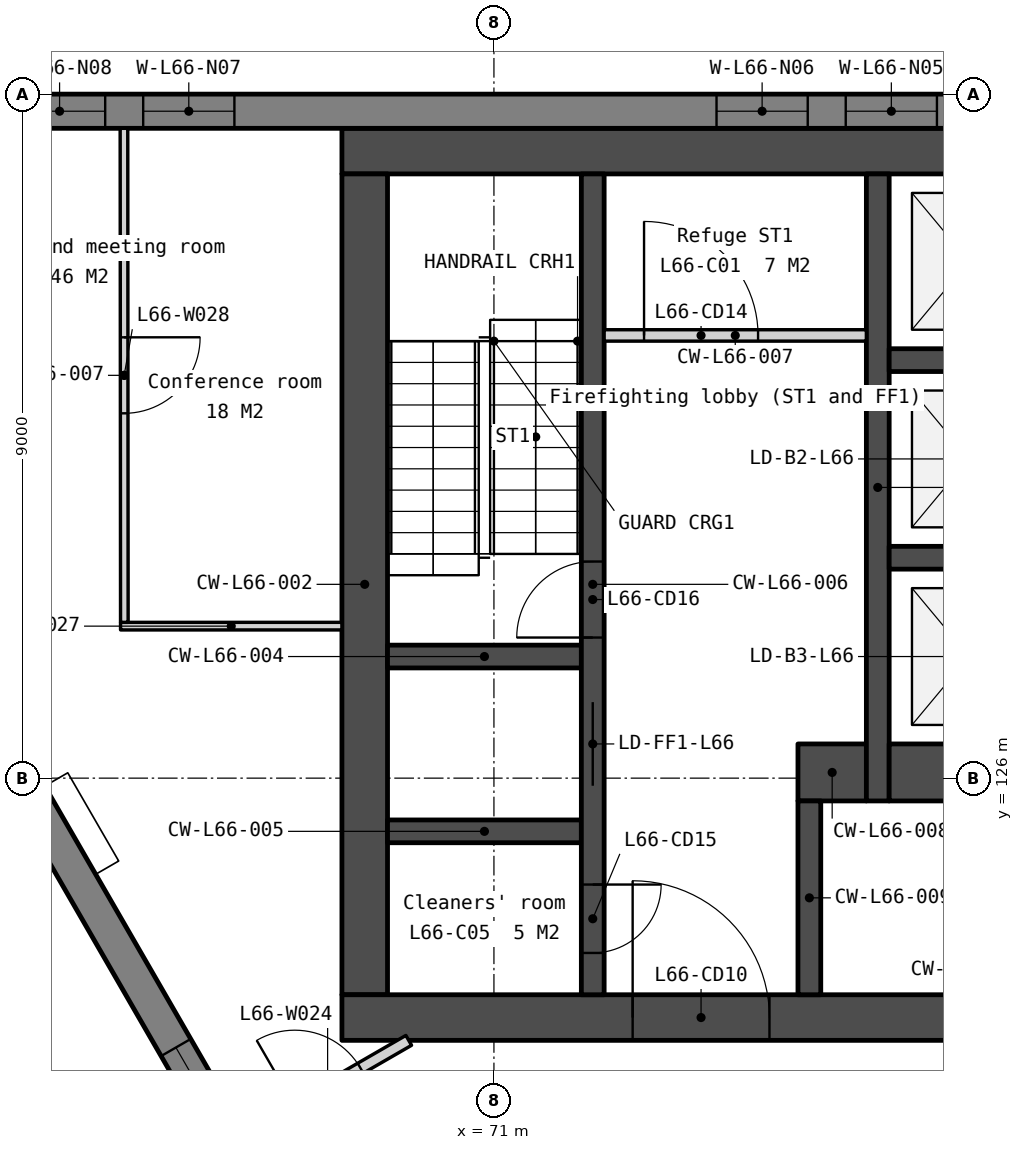
"""IFC4 building model, lengths in metres.
Left out: names, types, materials, properties, quantities, classifications, styles, units other than length and angle.
Written with IfcOpenShell. Run it as: python <this file> out.ifc"""

import sys

from ifc_helpers import new_model, si_unit, direction, frame, frame_2d, origin, place, context, subcontext, project, spatial, polyline, rectangle, outline, extrude, element, fill, save


model = new_model("IFC4")
c1 = context("Model", 3, precision=1e-05, world=origin(), true_north=direction((0.0, 1.0)))
c2 = subcontext(c1, "Body", "Model", "MODEL_VIEW")
j1 = project(units=[si_unit("LENGTHUNIT", "METRE"), si_unit("PLANEANGLEUNIT", "RADIAN")], contexts=[c1])
p1 = place(None, origin())
s1 = spatial("IfcSite", under=j1, at=p1, CompositionType="ELEMENT")
p2 = place(p1, origin())
s2 = spatial("IfcBuilding", under=s1, at=p2, CompositionType="ELEMENT")
p3 = place(p2, frame((0.0, 0.0, 269.9)))
s3 = spatial("IfcBuildingStorey", under=s2, at=p3, CompositionType="ELEMENT", Elevation=269.9)
p4 = place(p3, frame((69.0, 134.25, 0.0), z_axis=(0.0, 0.0, 1.0), x_axis=(1.0, 0.0, 0.0)))
e1 = element("IfcWall", 1, at=p4, inside=s3, PredefinedType="SOLIDWALL", context=c2, shape_type="SweptSolid", body=[
    extrude(rectangle(XDim=22.0, YDim=0.6, at=frame_2d((11.0, 0.0))), origin(), (0.0, 0.0, 1.0), 3.75),
])
p5 = place(p3, frame((69.3, 133.95, 0.0), z_axis=(0.0, 0.0, 1.0), x_axis=(0.0, -1.0, 0.0)))
e2 = element("IfcWall", 2, at=p5, inside=s3, PredefinedType="SOLIDWALL", context=c2, shape_type="SweptSolid", body=[
    extrude(rectangle(XDim=10.8, YDim=0.6, at=frame_2d((5.4, 0.0))), origin(), (0.0, 0.0, 1.0), 3.75),
])
p6 = place(p3, frame((69.0, 122.85, 0.0), z_axis=(0.0, 0.0, 1.0), x_axis=(1.0, 0.0, 0.0)))
e3 = element("IfcWall", 3, at=p6, inside=s3, PredefinedType="SOLIDWALL", context=c2, shape_type="SweptSolid", body=[
    extrude(rectangle(XDim=22.0, YDim=0.6, at=frame_2d((11.0, 0.0))), origin(), (0.0, 0.0, 1.0), 3.75),
])
p7 = place(p6, frame((16.375, 0.0, 0.0)))
e4 = element("IfcOpeningElement", 4, at=p7, cuts=e3, PredefinedType="OPENING", context=c2, shape_type="SweptSolid", body=[
    extrude(rectangle(XDim=1.8, YDim=2.1, at=frame_2d((0.9, 1.05))), frame((0.0, 0.31, 0.0), z_axis=(0.0, -1.0, 0.0), x_axis=(1.0, 0.0, 0.0)), (0.0, 0.0, 1.0), 0.62),
])
p8 = place(p6, frame((3.825, 0.0, 0.0)))
e5 = element("IfcOpeningElement", 5, at=p8, cuts=e3, PredefinedType="OPENING", context=c2, shape_type="SweptSolid", body=[
    extrude(rectangle(XDim=1.8, YDim=2.1, at=frame_2d((0.9, 1.05))), frame((0.0, 0.31, 0.0), z_axis=(0.0, -1.0, 0.0), x_axis=(1.0, 0.0, 0.0)), (0.0, 0.0, 1.0), 0.62),
])
p9 = place(p6, frame((12.85, 0.0, 0.0)))
e6 = element("IfcOpeningElement", 6, at=p9, cuts=e3, PredefinedType="OPENING", context=c2, shape_type="SweptSolid", body=[
    extrude(rectangle(XDim=1.5, YDim=2.1, at=frame_2d((0.75, 1.05))), frame((0.0, 0.31, 0.0), z_axis=(0.0, -1.0, 0.0), x_axis=(1.0, 0.0, 0.0)), (0.0, 0.0, 1.0), 0.62),
])
for number, where, z_axis, x_axis in (
    (7, (69.6, 127.6, 0.0), (0.0, 0.0, 1.0), (1.0, 0.0, 0.0)),
    (8, (69.6, 125.3, 0.0), (0.0, 0.0, 1.0), (1.0, 0.0, 0.0)),
):
    element("IfcWall", number, at=place(p3, frame(where, z_axis=z_axis, x_axis=x_axis)), inside=s3, PredefinedType="SOLIDWALL", context=c2, shape_type="SweptSolid", body=[
        extrude(rectangle(XDim=2.55, YDim=0.3, at=frame_2d((1.275, 0.0))), origin(), (0.0, 0.0, 1.0), 3.75),
    ])
p10 = place(p3, frame((72.3, 133.95, 0.0), z_axis=(0.0, 0.0, 1.0), x_axis=(0.0, -1.0, 0.0)))
e9 = element("IfcWall", 9, at=p10, inside=s3, PredefinedType="SOLIDWALL", context=c2, shape_type="SweptSolid", body=[
    extrude(rectangle(XDim=10.8, YDim=0.3, at=frame_2d((5.4, 0.0))), origin(), (0.0, 0.0, 1.0), 3.75),
])
p11 = place(p10, frame((6.95, 0.0, 0.0)))
e10 = element("IfcOpeningElement", 10, at=p11, cuts=e9, PredefinedType="OPENING", context=c2, shape_type="SweptSolid", body=[
    extrude(rectangle(XDim=1.1, YDim=2.1, at=frame_2d((0.55, 1.05))), frame((0.0, 0.16, 0.0), z_axis=(0.0, -1.0, 0.0), x_axis=(1.0, 0.0, 0.0)), (0.0, 0.0, 1.0), 0.32),
])
p12 = place(p10, frame((9.35, 0.0, 0.0)))
e11 = element("IfcOpeningElement", 11, at=p12, cuts=e9, PredefinedType="OPENING", context=c2, shape_type="SweptSolid", body=[
    extrude(rectangle(XDim=0.9, YDim=2.1, at=frame_2d((0.45, 1.05))), frame((0.0, 0.16, 0.0), z_axis=(0.0, -1.0, 0.0), x_axis=(1.0, 0.0, 0.0)), (0.0, 0.0, 1.0), 0.32),
])
p13 = place(p10, frame((5.1, 0.0, 0.0)))
e12 = element("IfcOpeningElement", 12, at=p13, cuts=e9, PredefinedType="OPENING", context=c2, shape_type="SweptSolid", body=[
    extrude(rectangle(XDim=1.0, YDim=2.1, at=frame_2d((0.5, 1.05))), frame((0.0, 0.16, 0.0), z_axis=(0.0, -1.0, 0.0), x_axis=(1.0, 0.0, 0.0)), (0.0, 0.0, 1.0), 0.32),
])
p14 = place(p3, frame((72.45, 131.825, 0.0), z_axis=(0.0, 0.0, 1.0), x_axis=(1.0, 0.0, 0.0)))
e13 = element("IfcWall", 13, at=p14, inside=s3, PredefinedType="PARTITIONING", context=c2, shape_type="SweptSolid", body=[
    extrude(rectangle(XDim=3.45, YDim=0.15, at=frame_2d((1.725, 0.0))), origin(), (0.0, 0.0, 1.0), 3.75),
])
p15 = place(p14, frame((0.525, 0.0, 0.0)))
e14 = element("IfcOpeningElement", 14, at=p15, cuts=e13, PredefinedType="OPENING", context=c2, shape_type="SweptSolid", body=[
    extrude(rectangle(XDim=1.5, YDim=2.1, at=frame_2d((0.75, 1.05))), frame((0.0, 0.085, 0.0), z_axis=(0.0, -1.0, 0.0), x_axis=(1.0, 0.0, 0.0)), (0.0, 0.0, 1.0), 0.17),
])
p16 = place(p3, frame((75.0, 126.075, 0.0), z_axis=(0.0, 0.0, 1.0), x_axis=(1.0, 0.0, 0.0)))
e15 = element("IfcWall", 15, at=p16, inside=s3, PredefinedType="SOLIDWALL", context=c2, shape_type="SweptSolid", body=[
    extrude(rectangle(XDim=0.9, YDim=0.75, at=frame_2d((0.45, 0.0))), origin(), (0.0, 0.0, 1.0), 3.75),
])
p17 = place(p3, frame((75.15, 125.7, 0.0), z_axis=(0.0, 0.0, 1.0), x_axis=(0.0, -1.0, 0.0)))
e16 = element("IfcWall", 16, at=p17, inside=s3, PredefinedType="SOLIDWALL", context=c2, shape_type="SweptSolid", body=[
    extrude(rectangle(XDim=2.55, YDim=0.3, at=frame_2d((1.275, 0.0))), origin(), (0.0, 0.0, 1.0), 3.75),
])
p18 = place(p3, frame((76.05, 133.95, 0.0), z_axis=(0.0, 0.0, 1.0), x_axis=(0.0, -1.0, 0.0)))
e17 = element("IfcWall", 17, at=p18, inside=s3, PredefinedType="SOLIDWALL", context=c2, shape_type="SweptSolid", body=[
    extrude(rectangle(XDim=8.25, YDim=0.3, at=frame_2d((4.125, 0.0))), origin(), (0.0, 0.0, 1.0), 3.75),
])
for number, where, z_axis, x_axis in (
    (18, (76.2, 131.5, 0.0), (0.0, 0.0, 1.0), (1.0, 0.0, 0.0)),
    (19, (76.2, 128.9, 0.0), (0.0, 0.0, 1.0), (1.0, 0.0, 0.0)),
):
    element("IfcWall", number, at=place(p3, frame(where, z_axis=z_axis, x_axis=x_axis)), inside=s3, PredefinedType="SOLIDWALL", context=c2, shape_type="SweptSolid", body=[
        extrude(rectangle(XDim=2.1, YDim=0.3, at=frame_2d((1.05, 0.0))), origin(), (0.0, 0.0, 1.0), 3.75),
    ])
p19 = place(p3, frame((76.2, 126.075, 0.0), z_axis=(0.0, 0.0, 1.0), x_axis=(1.0, 0.0, 0.0)))
e20 = element("IfcWall", 20, at=p19, inside=s3, PredefinedType="SOLIDWALL", context=c2, shape_type="SweptSolid", body=[
    extrude(rectangle(XDim=2.1, YDim=0.75, at=frame_2d((1.05, 0.0))), origin(), (0.0, 0.0, 1.0), 3.75),
])
p20 = place(p3, frame((98.486, 134.775, -0.15), z_axis=(0.0, 0.0, 1.0), x_axis=(-1.0, 0.0, 0.0)))
e21 = element("IfcWall", 21, at=p20, inside=s3, PredefinedType="SOLIDWALL", context=c2, shape_type="SweptSolid", body=[
    extrude(outline(polyline([(36.972, 0.0), (36.972, 3.9), (0.0, 3.9), (0.0, 0.0), (36.972, 0.0)])), frame((0.0, 0.225, 0.0), z_axis=(0.0, -1.0, 0.0), x_axis=(1.0, 0.0, 0.0)), (0.0, 0.0, 1.0), 0.45),
])
p21 = place(p20, frame((3.172, 0.0, 0.95)))
e22 = element("IfcOpeningElement", 22, at=p21, cuts=e21, PredefinedType="OPENING", context=c2, shape_type="SweptSolid", body=[
    extrude(rectangle(XDim=1.2, YDim=2.2, at=frame_2d((0.6, 1.1))), frame((0.0, 0.235, 0.0), z_axis=(0.0, -1.0, 0.0), x_axis=(1.0, 0.0, 0.0)), (0.0, 0.0, 1.0), 0.47),
])
p22 = place(p20, frame((4.872, 0.0, 0.95)))
e23 = element("IfcOpeningElement", 23, at=p22, cuts=e21, PredefinedType="OPENING", context=c2, shape_type="SweptSolid", body=[
    extrude(rectangle(XDim=1.2, YDim=2.2, at=frame_2d((0.6, 1.1))), frame((0.0, 0.235, 0.0), z_axis=(0.0, -1.0, 0.0), x_axis=(1.0, 0.0, 0.0)), (0.0, 0.0, 1.0), 0.47),
])
p23 = place(p20, frame((12.415, 0.0, 0.95)))
e24 = element("IfcOpeningElement", 24, at=p23, cuts=e21, PredefinedType="OPENING", context=c2, shape_type="SweptSolid", body=[
    extrude(rectangle(XDim=1.2, YDim=2.2, at=frame_2d((0.6, 1.1))), frame((0.0, 0.235, 0.0), z_axis=(0.0, -1.0, 0.0), x_axis=(1.0, 0.0, 0.0)), (0.0, 0.0, 1.0), 0.47),
])
p24 = place(p20, frame((14.115, 0.0, 0.95)))
e25 = element("IfcOpeningElement", 25, at=p24, cuts=e21, PredefinedType="OPENING", context=c2, shape_type="SweptSolid", body=[
    extrude(rectangle(XDim=1.2, YDim=2.2, at=frame_2d((0.6, 1.1))), frame((0.0, 0.235, 0.0), z_axis=(0.0, -1.0, 0.0), x_axis=(1.0, 0.0, 0.0)), (0.0, 0.0, 1.0), 0.47),
])
p25 = place(p20, frame((21.658, 0.0, 0.95)))
e26 = element("IfcOpeningElement", 26, at=p25, cuts=e21, PredefinedType="OPENING", context=c2, shape_type="SweptSolid", body=[
    extrude(rectangle(XDim=1.2, YDim=2.2, at=frame_2d((0.6, 1.1))), frame((0.0, 0.235, 0.0), z_axis=(0.0, -1.0, 0.0), x_axis=(1.0, 0.0, 0.0)), (0.0, 0.0, 1.0), 0.47),
])
p26 = place(p20, frame((23.358, 0.0, 0.95)))
e27 = element("IfcOpeningElement", 27, at=p26, cuts=e21, PredefinedType="OPENING", context=c2, shape_type="SweptSolid", body=[
    extrude(rectangle(XDim=1.2, YDim=2.2, at=frame_2d((0.6, 1.1))), frame((0.0, 0.235, 0.0), z_axis=(0.0, -1.0, 0.0), x_axis=(1.0, 0.0, 0.0)), (0.0, 0.0, 1.0), 0.47),
])
p27 = place(p20, frame((30.901, 0.0, 0.95)))
e28 = element("IfcOpeningElement", 28, at=p27, cuts=e21, PredefinedType="OPENING", context=c2, shape_type="SweptSolid", body=[
    extrude(rectangle(XDim=1.2, YDim=2.2, at=frame_2d((0.6, 1.1))), frame((0.0, 0.235, 0.0), z_axis=(0.0, -1.0, 0.0), x_axis=(1.0, 0.0, 0.0)), (0.0, 0.0, 1.0), 0.47),
])
p28 = place(p20, frame((32.601, 0.0, 0.95)))
e29 = element("IfcOpeningElement", 29, at=p28, cuts=e21, PredefinedType="OPENING", context=c2, shape_type="SweptSolid", body=[
    extrude(rectangle(XDim=1.2, YDim=2.2, at=frame_2d((0.6, 1.1))), frame((0.0, 0.235, 0.0), z_axis=(0.0, -1.0, 0.0), x_axis=(1.0, 0.0, 0.0)), (0.0, 0.0, 1.0), 0.47),
])
p29 = place(p3, frame((60.609, 133.207, -0.15), z_axis=(0.0, 0.0, 1.0), x_axis=(0.500002536638, -0.866023939251, 0.0)))
e30 = element("IfcWall", 30, at=p29, inside=s3, PredefinedType="SOLIDWALL", context=c2, shape_type="SweptSolid", body=[
    extrude(outline(polyline([(36.972, 0.0), (36.972, 3.9), (0.0, 3.9), (0.0, 0.0), (36.972, 0.0)])), frame((0.0, 0.225, 0.0), z_axis=(0.0, -1.0, 0.0), x_axis=(1.0, 0.0, 0.0)), (0.0, 0.0, 1.0), 0.45),
])
p30 = place(p29, frame((3.172, 0.0, 0.95)))
e31 = element("IfcOpeningElement", 31, at=p30, cuts=e30, PredefinedType="OPENING", context=c2, shape_type="SweptSolid", body=[
    extrude(rectangle(XDim=1.2, YDim=2.2, at=frame_2d((0.6, 1.1))), frame((0.0, 0.235, 0.0), z_axis=(0.0, -1.0, 0.0), x_axis=(1.0, 0.0, 0.0)), (0.0, 0.0, 1.0), 0.47),
])
p31 = place(p29, frame((4.872, 0.0, 0.95)))
e32 = element("IfcOpeningElement", 32, at=p31, cuts=e30, PredefinedType="OPENING", context=c2, shape_type="SweptSolid", body=[
    extrude(rectangle(XDim=1.2, YDim=2.2, at=frame_2d((0.6, 1.1))), frame((0.0, 0.235, 0.0), z_axis=(0.0, -1.0, 0.0), x_axis=(1.0, 0.0, 0.0)), (0.0, 0.0, 1.0), 0.47),
])
p32 = place(p29, frame((12.415, 0.0, 0.95)))
e33 = element("IfcOpeningElement", 33, at=p32, cuts=e30, PredefinedType="OPENING", context=c2, shape_type="SweptSolid", body=[
    extrude(rectangle(XDim=1.2, YDim=2.2, at=frame_2d((0.6, 1.1))), frame((0.0, 0.235, 0.0), z_axis=(0.0, -1.0, 0.0), x_axis=(1.0, 0.0, 0.0)), (0.0, 0.0, 1.0), 0.47),
])
p33 = place(p29, frame((14.115, 0.0, 0.95)))
e34 = element("IfcOpeningElement", 34, at=p33, cuts=e30, PredefinedType="OPENING", context=c2, shape_type="SweptSolid", body=[
    extrude(rectangle(XDim=1.2, YDim=2.2, at=frame_2d((0.6, 1.1))), frame((0.0, 0.235, 0.0), z_axis=(0.0, -1.0, 0.0), x_axis=(1.0, 0.0, 0.0)), (0.0, 0.0, 1.0), 0.47),
])
p34 = place(p29, frame((21.658, 0.0, 0.95)))
e35 = element("IfcOpeningElement", 35, at=p34, cuts=e30, PredefinedType="OPENING", context=c2, shape_type="SweptSolid", body=[
    extrude(rectangle(XDim=1.2, YDim=2.2, at=frame_2d((0.6, 1.1))), frame((0.0, 0.235, 0.0), z_axis=(0.0, -1.0, 0.0), x_axis=(1.0, 0.0, 0.0)), (0.0, 0.0, 1.0), 0.47),
])
p35 = place(p29, frame((23.358, 0.0, 0.95)))
e36 = element("IfcOpeningElement", 36, at=p35, cuts=e30, PredefinedType="OPENING", context=c2, shape_type="SweptSolid", body=[
    extrude(rectangle(XDim=1.2, YDim=2.2, at=frame_2d((0.6, 1.1))), frame((0.0, 0.235, 0.0), z_axis=(0.0, -1.0, 0.0), x_axis=(1.0, 0.0, 0.0)), (0.0, 0.0, 1.0), 0.47),
])
p36 = place(p29, frame((30.901, 0.0, 0.95)))
e37 = element("IfcOpeningElement", 37, at=p36, cuts=e30, PredefinedType="OPENING", context=c2, shape_type="SweptSolid", body=[
    extrude(rectangle(XDim=1.2, YDim=2.2, at=frame_2d((0.6, 1.1))), frame((0.0, 0.235, 0.0), z_axis=(0.0, -1.0, 0.0), x_axis=(1.0, 0.0, 0.0)), (0.0, 0.0, 1.0), 0.47),
])
p37 = place(p29, frame((32.601, 0.0, 0.95)))
e38 = element("IfcOpeningElement", 38, at=p37, cuts=e30, PredefinedType="OPENING", context=c2, shape_type="SweptSolid", body=[
    extrude(rectangle(XDim=1.2, YDim=2.2, at=frame_2d((0.6, 1.1))), frame((0.0, 0.235, 0.0), z_axis=(0.0, -1.0, 0.0), x_axis=(1.0, 0.0, 0.0)), (0.0, 0.0, 1.0), 0.47),
])
p38 = place(p3, frame((67.745, 121.318, 0.0), z_axis=(0.0, 0.0, 1.0), x_axis=(0.865990916707, 0.500059728613, 0.0)))
e39 = element("IfcWall", 39, at=p38, inside=s3, PredefinedType="PARTITIONING", context=c2, shape_type="SweptSolid", body=[
    extrude(rectangle(XDim=2.465, YDim=0.15, at=frame_2d((1.232, 0.0))), origin(), (0.0, 0.0, 1.0), 3.75),
])
p39 = place(p38, frame((0.732, 0.0, 0.0)))
e40 = element("IfcOpeningElement", 40, at=p39, cuts=e39, PredefinedType="OPENING", context=c2, shape_type="SweptSolid", body=[
    extrude(rectangle(XDim=1.0, YDim=2.1, at=frame_2d((0.5, 1.05))), frame((0.0, 0.085, 0.0), z_axis=(0.0, -1.0, 0.0), x_axis=(1.0, 0.0, 0.0)), (0.0, 0.0, 1.0), 0.17),
])
p40 = place(p3, frame((66.087, 128.0, 0.0), z_axis=(0.0, 0.0, 1.0), x_axis=(1.0, 0.0, 0.0)))
e41 = element("IfcWall", 41, at=p40, inside=s3, PredefinedType="PARTITIONING", context=c2, shape_type="SweptSolid", body=[
    extrude(rectangle(XDim=2.913, YDim=0.1, at=frame_2d((1.456, 0.0))), origin(), (0.0, 0.0, 1.0), 3.75),
])
p41 = place(p3, frame((66.132, 134.55, 0.0), z_axis=(0.0, 0.0, 1.0), x_axis=(0.000788761774, -0.999999688927, 0.0)))
e42 = element("IfcWall", 42, at=p41, inside=s3, PredefinedType="PARTITIONING", context=c2, shape_type="SweptSolid", body=[
    extrude(rectangle(XDim=6.5, YDim=0.1, at=frame_2d((3.25, 0.0))), origin(), (0.0, 0.0, 1.0), 3.75),
])
p42 = place(p41, frame((2.75, 0.0, 0.0)))
e43 = element("IfcOpeningElement", 43, at=p42, cuts=e42, PredefinedType="OPENING", context=c2, shape_type="SweptSolid", body=[
    extrude(rectangle(XDim=1.0, YDim=2.1, at=frame_2d((0.5, 1.05))), frame((0.0, 0.06, 0.0), z_axis=(0.0, -1.0, 0.0), x_axis=(1.0, 0.0, 0.0)), (0.0, 0.0, 1.0), 0.12),
])
p43 = place(p11, origin())
e44 = element("IfcDoor", 44, at=p43, inside=s3, OperationType="SLIDING_TO_LEFT", PredefinedType="DOOR", context=c2, shape_type="SweptSolid", body=[
    extrude(rectangle(XDim=1.1, YDim=2.1, at=frame_2d((0.55, 1.05))), frame((0.0, 0.025, 0.0), z_axis=(0.0, -1.0, 0.0), x_axis=(1.0, 0.0, 0.0)), (0.0, 0.0, 1.0), 0.05),
])
fill(e10, e44)
p44 = place(p8, origin())
e45 = element("IfcDoor", 45, at=p44, inside=s3, OperationType="DOUBLE_DOOR_DOUBLE_SWING", PredefinedType="DOOR", context=c2, shape_type="SweptSolid", body=[
    extrude(rectangle(XDim=1.8, YDim=2.1, at=frame_2d((0.9, 1.05))), frame((0.0, 0.025, 0.0), z_axis=(0.0, -1.0, 0.0), x_axis=(1.0, 0.0, 0.0)), (0.0, 0.0, 1.0), 0.05),
])
fill(e5, e45)
p45 = place(p15, origin())
e46 = element("IfcDoor", 46, at=p45, inside=s3, OperationType="DOUBLE_DOOR_DOUBLE_SWING", PredefinedType="DOOR", context=c2, shape_type="SweptSolid", body=[
    extrude(rectangle(XDim=1.5, YDim=2.1, at=frame_2d((0.75, 1.05))), frame((0.0, 0.025, 0.0), z_axis=(0.0, -1.0, 0.0), x_axis=(1.0, 0.0, 0.0)), (0.0, 0.0, 1.0), 0.05),
])
fill(e14, e46)
p46 = place(p12, origin())
e47 = element("IfcDoor", 47, at=p46, inside=s3, OperationType="SINGLE_SWING_LEFT", PredefinedType="DOOR", context=c2, shape_type="SweptSolid", body=[
    extrude(rectangle(XDim=0.9, YDim=2.1, at=frame_2d((0.45, 1.05))), frame((0.0, 0.025, 0.0), z_axis=(0.0, -1.0, 0.0), x_axis=(1.0, 0.0, 0.0)), (0.0, 0.0, 1.0), 0.05),
])
fill(e11, e47)
p47 = place(p13, origin())
e48 = element("IfcDoor", 48, at=p47, inside=s3, OperationType="SINGLE_SWING_RIGHT", PredefinedType="DOOR", context=c2, shape_type="SweptSolid", body=[
    extrude(rectangle(XDim=1.0, YDim=2.1, at=frame_2d((0.5, 1.05))), frame((0.0, 0.025, 0.0), z_axis=(0.0, -1.0, 0.0), x_axis=(1.0, 0.0, 0.0)), (0.0, 0.0, 1.0), 0.05),
])
fill(e12, e48)
p48 = place(p25, origin())
e49 = element("IfcWindow", 49, at=p48, inside=s3, PartitioningType="SINGLE_PANEL", PredefinedType="WINDOW", context=c2, shape_type="SweptSolid", body=[
    extrude(rectangle(XDim=1.2, YDim=2.2, at=frame_2d((0.6, 1.1))), frame((0.0, 0.03, 0.0), z_axis=(0.0, -1.0, 0.0), x_axis=(1.0, 0.0, 0.0)), (0.0, 0.0, 1.0), 0.06),
])
fill(e26, e49)
p49 = place(p26, origin())
e50 = element("IfcWindow", 50, at=p49, inside=s3, PartitioningType="SINGLE_PANEL", PredefinedType="WINDOW", context=c2, shape_type="SweptSolid", body=[
    extrude(rectangle(XDim=1.2, YDim=2.2, at=frame_2d((0.6, 1.1))), frame((0.0, 0.03, 0.0), z_axis=(0.0, -1.0, 0.0), x_axis=(1.0, 0.0, 0.0)), (0.0, 0.0, 1.0), 0.06),
])
fill(e27, e50)
p50 = place(p27, origin())
e51 = element("IfcWindow", 51, at=p50, inside=s3, PartitioningType="SINGLE_PANEL", PredefinedType="WINDOW", context=c2, shape_type="SweptSolid", body=[
    extrude(rectangle(XDim=1.2, YDim=2.2, at=frame_2d((0.6, 1.1))), frame((0.0, 0.03, 0.0), z_axis=(0.0, -1.0, 0.0), x_axis=(1.0, 0.0, 0.0)), (0.0, 0.0, 1.0), 0.06),
])
fill(e28, e51)
p51 = place(p28, origin())
e52 = element("IfcWindow", 52, at=p51, inside=s3, PartitioningType="SINGLE_PANEL", PredefinedType="WINDOW", context=c2, shape_type="SweptSolid", body=[
    extrude(rectangle(XDim=1.2, YDim=2.2, at=frame_2d((0.6, 1.1))), frame((0.0, 0.03, 0.0), z_axis=(0.0, -1.0, 0.0), x_axis=(1.0, 0.0, 0.0)), (0.0, 0.0, 1.0), 0.06),
])
fill(e29, e52)
p52 = place(p32, origin())
e53 = element("IfcWindow", 53, at=p52, inside=s3, PartitioningType="SINGLE_PANEL", PredefinedType="WINDOW", context=c2, shape_type="SweptSolid", body=[
    extrude(rectangle(XDim=1.2, YDim=2.2, at=frame_2d((0.6, 1.1))), frame((0.0, 0.03, 0.0), z_axis=(0.0, -1.0, 0.0), x_axis=(1.0, 0.0, 0.0)), (0.0, 0.0, 1.0), 0.06),
])
fill(e33, e53)
p53 = place(p42, origin())
e54 = element("IfcDoor", 54, at=p53, inside=s3, OperationType="SINGLE_SWING_LEFT", PredefinedType="DOOR", context=c2, shape_type="SweptSolid", body=[
    extrude(rectangle(XDim=1.0, YDim=2.1, at=frame_2d((0.5, 1.05))), frame((0.0, 0.025, 0.0), z_axis=(0.0, -1.0, 0.0), x_axis=(1.0, 0.0, 0.0)), (0.0, 0.0, 1.0), 0.05),
])
fill(e43, e54)
p54 = place(p39, origin())
e55 = element("IfcDoor", 55, at=p54, inside=s3, OperationType="SINGLE_SWING_LEFT", PredefinedType="DOOR", context=c2, shape_type="SweptSolid", body=[
    extrude(rectangle(XDim=1.0, YDim=2.1, at=frame_2d((0.5, 1.05))), frame((0.0, 0.025, 0.0), z_axis=(0.0, -1.0, 0.0), x_axis=(1.0, 0.0, 0.0)), (0.0, 0.0, 1.0), 0.05),
])
fill(e40, e55)
save(model, sys.argv[1])
